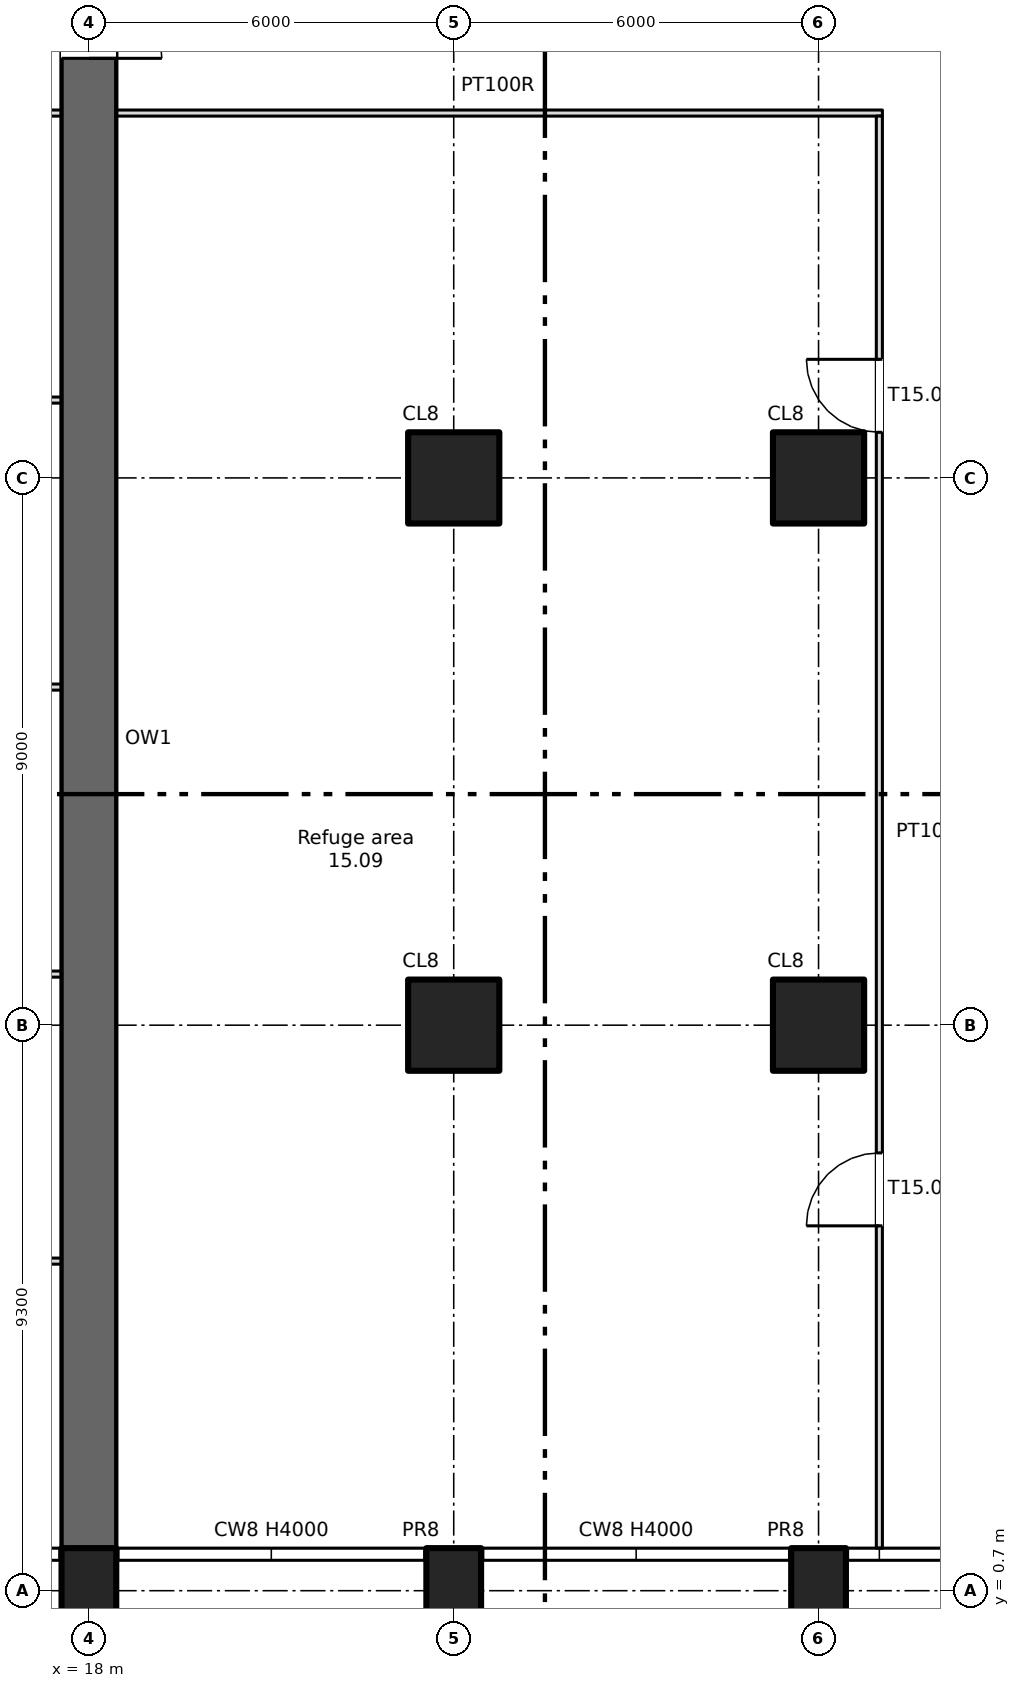
"""IFC4 building model, lengths in metres.
Left out: names, types, materials, properties, quantities, classifications, styles, units other than length and angle.
Written with IfcOpenShell. Run it as: python <this file> out.ifc"""

import sys

from ifc_helpers import new_model, si_unit, direction, frame, frame_2d, origin, origin_2d, place, context, subcontext, project, spatial, rectangle, extrude, element, fill, save


model = new_model("IFC4")
c1 = context("Model", 3, precision=1e-05, world=origin(), true_north=direction((0.0, 1.0)))
c2 = subcontext(c1, "Body", "Model", "MODEL_VIEW")
j1 = project(units=[si_unit("LENGTHUNIT", "METRE"), si_unit("PLANEANGLEUNIT", "RADIAN")], contexts=[c1])
p1 = place(None, origin())
s1 = spatial("IfcSite", under=j1, at=p1, CompositionType="ELEMENT")
p2 = place(p1, origin())
s2 = spatial("IfcBuilding", under=s1, at=p2, CompositionType="ELEMENT")
p3 = place(p2, frame((0.0, 0.0, 90.0)))
s3 = spatial("IfcBuildingStorey", under=s2, at=p3, CompositionType="ELEMENT", Elevation=90.0)
for number, where, z_axis, x_axis in (
    (1, (18.0, 0.7, -0.6), (0.0, 0.0, 1.0), (1.0, 0.0, 0.0)),
    (2, (24.0, 0.7, -0.6), (0.0, 0.0, 1.0), (1.0, 0.0, 0.0)),
    (3, (30.0, 0.7, -0.6), (0.0, 0.0, 1.0), (1.0, 0.0, 0.0)),
):
    element("IfcColumn", number, at=place(p3, frame(where, z_axis=z_axis, x_axis=x_axis)), inside=s3, PredefinedType="COLUMN", context=c2, shape_type="SweptSolid", body=[
        extrude(rectangle(XDim=0.9, YDim=1.4, at=origin_2d()), origin(), (0.0, 0.0, 1.0), 4.8),
    ])
for number, where, z_axis, x_axis in (
    (4, (24.0, 10.0, 0.0), (0.0, 0.0, 1.0), (1.0, 0.0, 0.0)),
    (5, (24.0, 19.0, 0.0), (0.0, 0.0, 1.0), (1.0, 0.0, 0.0)),
    (6, (30.0, 10.0, 0.0), (0.0, 0.0, 1.0), (1.0, 0.0, 0.0)),
    (7, (30.0, 19.0, 0.0), (0.0, 0.0, 1.0), (1.0, 0.0, 0.0)),
):
    element("IfcColumn", number, at=place(p3, frame(where, z_axis=z_axis, x_axis=x_axis)), inside=s3, PredefinedType="COLUMN", context=c2, shape_type="SweptSolid", body=[
        extrude(rectangle(XDim=1.5, YDim=1.5, at=origin_2d()), origin(), (0.0, 0.0, 1.0), 4.2),
    ])
p4 = place(p3, frame((18.0, 1.4, 0.0), z_axis=(0.0, 0.0, 1.0), x_axis=(0.0, 1.0, 0.0)))
e8 = element("IfcWall", 8, at=p4, inside=s3, PredefinedType="SHEAR", context=c2, shape_type="SweptSolid", body=[
    extrude(rectangle(XDim=26.6, YDim=0.9, at=frame_2d((13.3, 0.0))), origin(), (0.0, 0.0, 1.0), 4.2),
])
p5 = place(p4, frame((24.5, 0.0, 0.0)))
e9 = element("IfcOpeningElement", 9, at=p5, cuts=e8, PredefinedType="OPENING", context=c2, shape_type="SweptSolid", body=[
    extrude(rectangle(XDim=1.2, YDim=2.1, at=frame_2d((0.6, 1.05))), frame((0.0, 0.46, 0.0), z_axis=(0.0, -1.0, 0.0), x_axis=(1.0, 0.0, 0.0)), (0.0, 0.0, 1.0), 0.92),
])
p6 = place(p3, frame((3.25, 6.12, 0.0), z_axis=(0.0, 0.0, 1.0), x_axis=(1.0, 0.0, 0.0)))
e10 = element("IfcWall", 10, at=p6, inside=s3, PredefinedType="PARTITIONING", context=c2, shape_type="SweptSolid", body=[
    extrude(rectangle(XDim=14.35, YDim=0.1, at=frame_2d((7.175, 0.0))), origin(), (0.0, 0.0, 1.0), 2.4),
])
p7 = place(p6, frame((6.65, 0.0, 0.0)))
e11 = element("IfcOpeningElement", 11, at=p7, cuts=e10, PredefinedType="OPENING", context=c2, shape_type="SweptSolid", body=[
    extrude(rectangle(XDim=1.0, YDim=2.1, at=frame_2d((0.5, 1.05))), frame((0.0, 0.06, 0.0), z_axis=(0.0, -1.0, 0.0), x_axis=(1.0, 0.0, 0.0)), (0.0, 0.0, 1.0), 0.12),
])
for number, where, z_axis, x_axis in (
    (12, (3.25, 10.84, 0.0), (0.0, 0.0, 1.0), (1.0, 0.0, 0.0)),
    (13, (3.25, 15.56, 0.0), (0.0, 0.0, 1.0), (1.0, 0.0, 0.0)),
    (14, (3.25, 20.28, 0.0), (0.0, 0.0, 1.0), (1.0, 0.0, 0.0)),
):
    element("IfcWall", number, at=place(p3, frame(where, z_axis=z_axis, x_axis=x_axis)), inside=s3, PredefinedType="PARTITIONING", context=c2, shape_type="SweptSolid", body=[
        extrude(rectangle(XDim=14.35, YDim=0.1, at=frame_2d((7.175, 0.0))), origin(), (0.0, 0.0, 1.0), 4.2),
    ])
p8 = place(p3, frame((3.15, 25.0, 0.0), z_axis=(0.0, 0.0, 1.0), x_axis=(1.0, 0.0, 0.0)))
e15 = element("IfcWall", 15, at=p8, inside=s3, PredefinedType="PARTITIONING", context=c2, shape_type="SweptSolid", body=[
    extrude(rectangle(XDim=14.45, YDim=0.1, at=frame_2d((7.225, 0.0))), origin(), (0.0, 0.0, 1.0), 4.2),
])
p9 = place(p8, frame((6.75, 0.0, 0.0)))
e16 = element("IfcOpeningElement", 16, at=p9, cuts=e15, PredefinedType="OPENING", context=c2, shape_type="SweptSolid", body=[
    extrude(rectangle(XDim=1.0, YDim=2.1, at=frame_2d((0.5, 1.05))), frame((0.0, 0.06, 0.0), z_axis=(0.0, -1.0, 0.0), x_axis=(1.0, 0.0, 0.0)), (0.0, 0.0, 1.0), 0.12),
])
p10 = place(p3, frame((18.4, 25.0, 0.0), z_axis=(0.0, 0.0, 1.0), x_axis=(1.0, 0.0, 0.0)))
e17 = element("IfcWall", 17, at=p10, inside=s3, PredefinedType="PARTITIONING", context=c2, shape_type="SweptSolid", body=[
    extrude(rectangle(XDim=12.65, YDim=0.1, at=frame_2d((6.325, 0.0))), origin(), (0.0, 0.0, 1.0), 4.2),
])
p11 = place(p3, frame((31.0, 1.4, 0.0), z_axis=(0.0, 0.0, 1.0), x_axis=(0.0, 1.0, 0.0)))
e18 = element("IfcWall", 18, at=p11, inside=s3, PredefinedType="PARTITIONING", context=c2, shape_type="SweptSolid", body=[
    extrude(rectangle(XDim=23.55, YDim=0.1, at=frame_2d((11.775, 0.0))), origin(), (0.0, 0.0, 1.0), 4.2),
])
p12 = place(p11, frame((5.3, 0.0, 0.0)))
e19 = element("IfcOpeningElement", 19, at=p12, cuts=e18, PredefinedType="OPENING", context=c2, shape_type="SweptSolid", body=[
    extrude(rectangle(XDim=1.2, YDim=2.1, at=frame_2d((0.6, 1.05))), frame((0.0, 0.06, 0.0), z_axis=(0.0, -1.0, 0.0), x_axis=(1.0, 0.0, 0.0)), (0.0, 0.0, 1.0), 0.12),
])
p13 = place(p11, frame((18.35, 0.0, 0.0)))
e20 = element("IfcOpeningElement", 20, at=p13, cuts=e18, PredefinedType="OPENING", context=c2, shape_type="SweptSolid", body=[
    extrude(rectangle(XDim=1.2, YDim=2.1, at=frame_2d((0.6, 1.05))), frame((0.0, 0.06, 0.0), z_axis=(0.0, -1.0, 0.0), x_axis=(1.0, 0.0, 0.0)), (0.0, 0.0, 1.0), 0.12),
])
p14 = place(p12, origin())
e21 = element("IfcDoor", 21, at=p14, inside=s3, OperationType="SINGLE_SWING_LEFT", PredefinedType="DOOR", context=c2, shape_type="SweptSolid", body=[
    extrude(rectangle(XDim=1.2, YDim=2.1, at=frame_2d((0.6, 1.05))), frame((0.0, 0.025, 0.0), z_axis=(0.0, -1.0, 0.0), x_axis=(1.0, 0.0, 0.0)), (0.0, 0.0, 1.0), 0.05),
])
fill(e19, e21)
p15 = place(p13, origin())
e22 = element("IfcDoor", 22, at=p15, inside=s3, OperationType="SINGLE_SWING_RIGHT", PredefinedType="DOOR", context=c2, shape_type="SweptSolid", body=[
    extrude(rectangle(XDim=1.2, YDim=2.1, at=frame_2d((0.6, 1.05))), frame((0.0, 0.025, 0.0), z_axis=(0.0, -1.0, 0.0), x_axis=(1.0, 0.0, 0.0)), (0.0, 0.0, 1.0), 0.05),
])
fill(e20, e22)
p16 = place(p5, origin())
e23 = element("IfcDoor", 23, at=p16, inside=s3, OperationType="SINGLE_SWING_LEFT", PredefinedType="DOOR", context=c2, shape_type="SweptSolid", body=[
    extrude(rectangle(XDim=1.2, YDim=2.1, at=frame_2d((0.6, 1.05))), frame((0.0, 0.025, 0.0), z_axis=(0.0, -1.0, 0.0), x_axis=(1.0, 0.0, 0.0)), (0.0, 0.0, 1.0), 0.05),
])
fill(e9, e23)
save(model, sys.argv[1])
